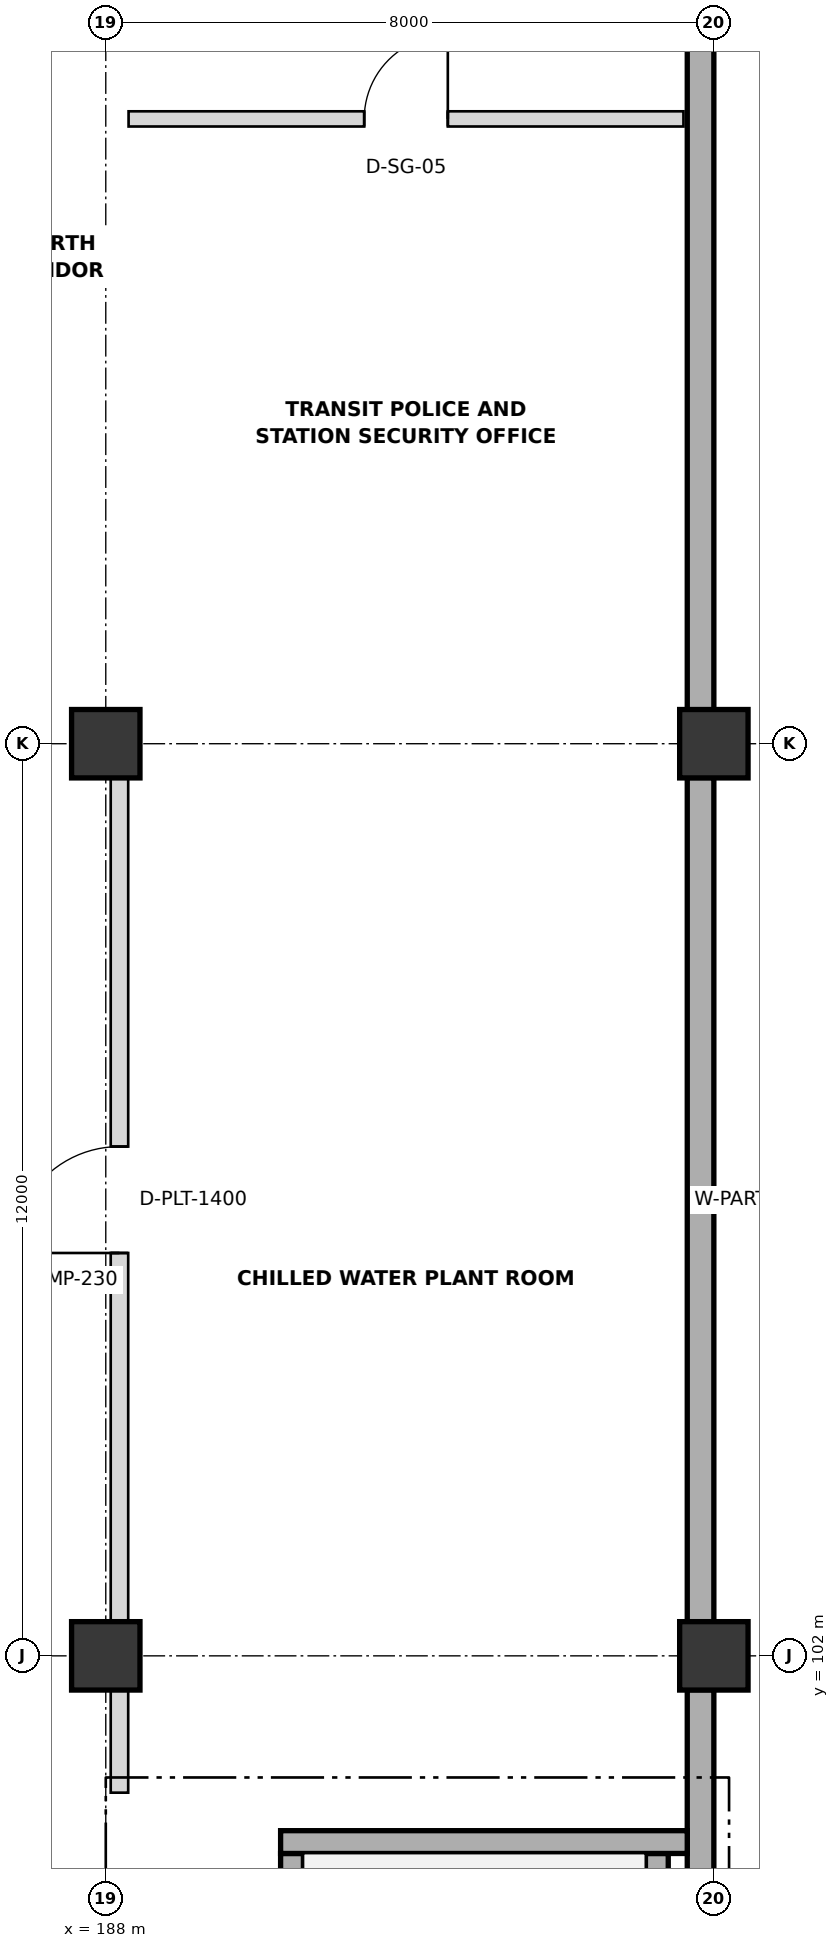
"""IFC4 building model, lengths in metres.
Left out: names, types, materials, properties, quantities, classifications, styles, units other than length and angle.
Written with IfcOpenShell. Run it as: python <this file> out.ifc"""

import sys

from ifc_helpers import new_model, si_unit, direction, frame, frame_2d, origin, origin_2d, place, context, subcontext, project, spatial, rectangle, extrude, element, fill, save


model = new_model("IFC4")
c1 = context("Model", 3, precision=1e-05, world=origin(), true_north=direction((0.0, 1.0)))
c2 = subcontext(c1, "Body", "Model", "MODEL_VIEW")
j1 = project(units=[si_unit("LENGTHUNIT", "METRE"), si_unit("PLANEANGLEUNIT", "RADIAN")], contexts=[c1])
p1 = place(None, origin())
s1 = spatial("IfcSite", under=j1, at=p1, CompositionType="ELEMENT")
p2 = place(p1, origin())
s2 = spatial("IfcBuilding", under=s1, at=p2, CompositionType="ELEMENT")
p3 = place(p2, origin())
s3 = spatial("IfcBuildingStorey", under=s2, at=p3, CompositionType="ELEMENT", Elevation=0.0)
for number, where, z_axis, x_axis in (
    (1, (188.0, 102.0, 0.0), (0.0, 0.0, 1.0), (1.0, 0.0, 0.0)),
    (2, (188.0, 114.0, 0.0), (0.0, 0.0, 1.0), (1.0, 0.0, 0.0)),
    (3, (196.0, 102.0, 0.0), (0.0, 0.0, 1.0), (1.0, 0.0, 0.0)),
    (4, (196.0, 114.0, 0.0), (0.0, 0.0, 1.0), (1.0, 0.0, 0.0)),
):
    element("IfcColumn", number, at=place(p3, frame(where, z_axis=z_axis, x_axis=x_axis)), inside=s3, PredefinedType="COLUMN", context=c2, shape_type="SweptSolid", body=[
        extrude(rectangle(XDim=0.9, YDim=0.9, at=origin_2d()), origin(), (0.0, 0.0, 1.0), 5.4),
    ])
for number, where, z_axis, x_axis in (
    (5, (195.825, 101.555, 0.0), (0.0, 0.0, 1.0), (0.0, -1.0, 0.0)),
    (6, (195.825, 113.555, 0.0), (0.0, 0.0, 1.0), (0.0, -1.0, 0.0)),
    (7, (195.825, 125.555, 0.0), (0.0, 0.0, 1.0), (0.0, -1.0, 0.0)),
):
    element("IfcWall", number, at=place(p3, frame(where, z_axis=z_axis, x_axis=x_axis)), inside=s3, PredefinedType="SOLIDWALL", context=c2, shape_type="SweptSolid", body=[
        extrude(rectangle(XDim=11.11, YDim=0.35, at=frame_2d((5.555, 0.0))), origin(), (0.0, 0.0, 1.0), 5.4),
    ])
for number, where, z_axis, x_axis in (
    (8, (190.45, 90.8, 0.0), (0.0, 0.0, 1.0), (0.0, 1.0, 0.0)),
    (9, (195.25, 99.4, 0.0), (0.0, 0.0, 1.0), (0.0, -1.0, 0.0)),
):
    element("IfcWall", number, at=place(p3, frame(where, z_axis=z_axis, x_axis=x_axis)), inside=s3, PredefinedType="SHEAR", context=c2, shape_type="SweptSolid", body=[
        extrude(rectangle(XDim=8.6, YDim=0.3, at=frame_2d((4.3, 0.0))), origin(), (0.0, 0.0, 1.0), 5.4),
    ])
p4 = place(p3, frame((190.3, 99.55, 0.0), z_axis=(0.0, 0.0, 1.0), x_axis=(1.0, 0.0, 0.0)))
e10 = element("IfcWall", 10, at=p4, inside=s3, PredefinedType="SHEAR", context=c2, shape_type="SweptSolid", body=[
    extrude(rectangle(XDim=5.35, YDim=0.3, at=frame_2d((2.675, 0.0))), origin(), (0.0, 0.0, 1.0), 5.4),
])
p5 = place(p3, frame((188.3, 122.22, 0.0), z_axis=(0.0, 0.0, 1.0), x_axis=(1.0, 0.0, 0.0)))
e11 = element("IfcWall", 11, at=p5, inside=s3, PredefinedType="PARTITIONING", context=c2, shape_type="SweptSolid", body=[
    extrude(rectangle(XDim=7.3, YDim=0.2, at=frame_2d((3.65, 0.0))), origin(), (0.0, 0.0, 1.0), 4.358),
])
p6 = place(p5, frame((3.1, 0.0, 0.0)))
e12 = element("IfcOpeningElement", 12, at=p6, cuts=e11, PredefinedType="OPENING", context=c2, shape_type="SweptSolid", body=[
    extrude(rectangle(XDim=1.1, YDim=2.1, at=frame_2d((0.55, 1.05))), frame((0.0, 0.11, 0.0), z_axis=(0.0, -1.0, 0.0), x_axis=(1.0, 0.0, 0.0)), (0.0, 0.0, 1.0), 0.22),
])
p7 = place(p3, frame((188.18, 100.2, 0.0), z_axis=(0.0, 0.0, 1.0), x_axis=(0.0, 1.0, 0.0)))
e13 = element("IfcWall", 13, at=p7, inside=s3, PredefinedType="PARTITIONING", context=c2, shape_type="SweptSolid", body=[
    extrude(rectangle(XDim=13.5, YDim=0.23, at=frame_2d((6.75, 0.0))), origin(), (0.0, 0.0, 1.0), 4.258),
])
p8 = place(p7, frame((7.1, 0.0, 0.0)))
e14 = element("IfcOpeningElement", 14, at=p8, cuts=e13, PredefinedType="OPENING", context=c2, shape_type="SweptSolid", body=[
    extrude(rectangle(XDim=1.4, YDim=2.2, at=frame_2d((0.7, 1.1))), frame((0.0, 0.125, 0.0), z_axis=(0.0, -1.0, 0.0), x_axis=(1.0, 0.0, 0.0)), (0.0, 0.0, 1.0), 0.25),
])
p9 = place(p6, origin())
e15 = element("IfcDoor", 15, at=p9, inside=s3, OperationType="SINGLE_SWING_RIGHT", PredefinedType="DOOR", context=c2, shape_type="SweptSolid", body=[
    extrude(rectangle(XDim=1.1, YDim=2.1, at=frame_2d((0.55, 1.05))), frame((0.0, 0.025, 0.0), z_axis=(0.0, -1.0, 0.0), x_axis=(1.0, 0.0, 0.0)), (0.0, 0.0, 1.0), 0.05),
])
fill(e12, e15)
p10 = place(p8, origin())
e16 = element("IfcDoor", 16, at=p10, inside=s3, OperationType="SINGLE_SWING_LEFT", PredefinedType="DOOR", context=c2, shape_type="SweptSolid", body=[
    extrude(rectangle(XDim=1.4, YDim=2.2, at=frame_2d((0.7, 1.1))), frame((0.0, 0.025, 0.0), z_axis=(0.0, -1.0, 0.0), x_axis=(1.0, 0.0, 0.0)), (0.0, 0.0, 1.0), 0.05),
])
fill(e14, e16)
save(model, sys.argv[1])
